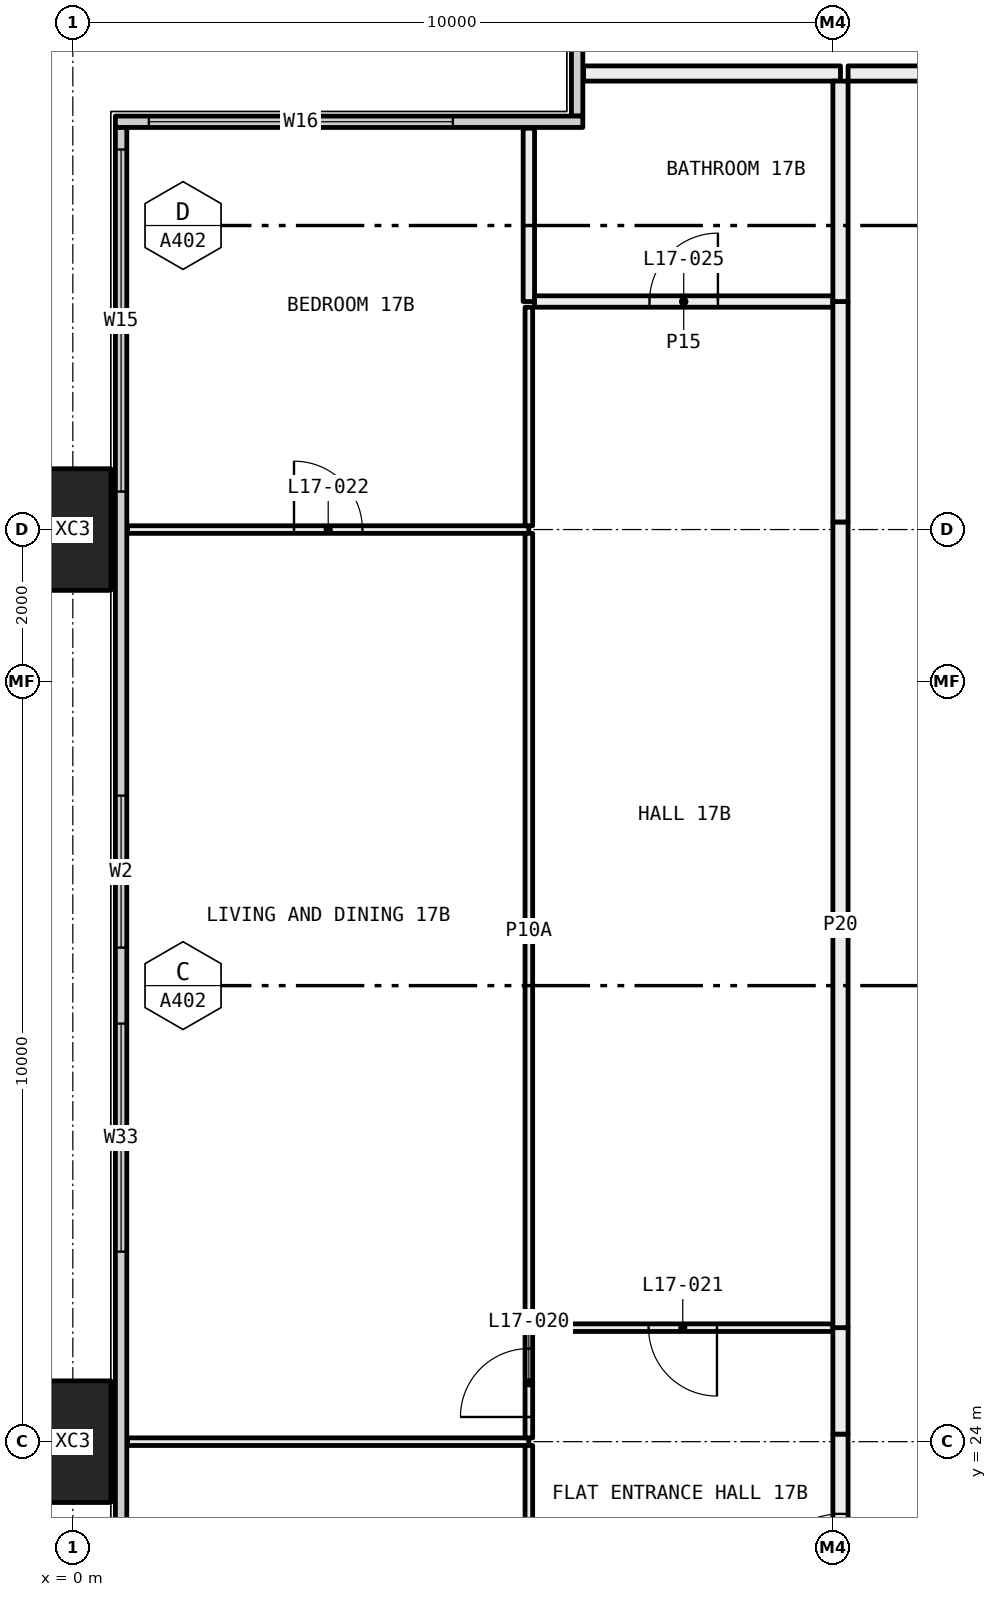
"""IFC4 building model, lengths in metres.
Left out: names, types, materials, properties, quantities, classifications, styles, units other than length and angle.
Written with IfcOpenShell. Run it as: python <this file> out.ifc"""

import sys

from ifc_helpers import new_model, si_unit, direction, frame, frame_2d, origin, origin_2d, place, context, subcontext, project, spatial, rectangle, hollow_rectangle, extrude, element, fill, save


model = new_model("IFC4")
c1 = context("Model", 3, precision=1e-05, world=origin(), true_north=direction((0.0, 1.0)))
c2 = subcontext(c1, "Body", "Model", "MODEL_VIEW")
j1 = project(units=[si_unit("LENGTHUNIT", "METRE"), si_unit("PLANEANGLEUNIT", "RADIAN")], contexts=[c1])
p1 = place(None, origin())
s1 = spatial("IfcSite", under=j1, at=p1, CompositionType="ELEMENT")
p2 = place(p1, origin())
s2 = spatial("IfcBuilding", under=s1, at=p2, CompositionType="ELEMENT")
p3 = place(p2, frame((0.0, 0.0, 71.4)))
s3 = spatial("IfcBuildingStorey", under=s2, at=p3, CompositionType="ELEMENT", Elevation=71.4)
for number, where, z_axis, x_axis in (
    (1, (0.0, 24.0, -0.4), (0.0, 0.0, 1.0), (0.0, 1.0, 0.0)),
    (2, (0.0, 36.0, -0.4), (0.0, 0.0, 1.0), (0.0, 1.0, 0.0)),
):
    element("IfcColumn", number, at=place(p3, frame(where, z_axis=z_axis, x_axis=x_axis)), inside=s3, PredefinedType="COLUMN", context=c2, shape_type="SweptSolid", body=[
        extrude(hollow_rectangle(XDim=1.6, YDim=1.0, WallThickness=0.065, at=origin_2d()), origin(), (0.0, 0.0, 1.0), 3.45),
    ])
p4 = place(p3, frame((6.635, 41.44, 0.0), z_axis=(0.0, 0.0, 1.0), x_axis=(0.0, 1.0, 0.0)))
e3 = element("IfcWall", 3, at=p4, inside=s3, PredefinedType="ELEMENTEDWALL", context=c2, shape_type="SweptSolid", body=[
    extrude(rectangle(XDim=5.85, YDim=0.15, at=frame_2d((2.925, 0.0))), origin(), (0.0, 0.0, 1.0), 3.05),
])
p5 = place(p4, frame((1.56, 0.0, 0.45)))
e4 = element("IfcOpeningElement", 4, at=p5, cuts=e3, PredefinedType="OPENING", context=c2, shape_type="SweptSolid", body=[
    extrude(rectangle(XDim=4.0, YDim=2.55, at=frame_2d((2.0, 1.275))), frame((0.0, 0.085, 0.0), z_axis=(0.0, -1.0, 0.0), x_axis=(1.0, 0.0, 0.0)), (0.0, 0.0, 1.0), 0.17),
])
p6 = place(p3, frame((0.56, 41.365, 0.0), z_axis=(0.0, 0.0, 1.0), x_axis=(1.0, 0.0, 0.0)))
e5 = element("IfcWall", 5, at=p6, inside=s3, PredefinedType="ELEMENTEDWALL", context=c2, shape_type="SweptSolid", body=[
    extrude(rectangle(XDim=6.15, YDim=0.15, at=frame_2d((3.075, 0.0))), origin(), (0.0, 0.0, 1.0), 3.05),
])
p7 = place(p6, frame((0.44, 0.0, 0.45)))
e6 = element("IfcOpeningElement", 6, at=p7, cuts=e5, PredefinedType="OPENING", context=c2, shape_type="SweptSolid", body=[
    extrude(rectangle(XDim=4.0, YDim=2.55, at=frame_2d((2.0, 1.275))), frame((0.0, 0.085, 0.0), z_axis=(0.0, -1.0, 0.0), x_axis=(1.0, 0.0, 0.0)), (0.0, 0.0, 1.0), 0.17),
])
p8 = place(p3, frame((0.635, 6.71, 0.0), z_axis=(0.0, 0.0, 1.0), x_axis=(0.0, 1.0, 0.0)))
e7 = element("IfcWall", 7, at=p8, inside=s3, PredefinedType="ELEMENTEDWALL", context=c2, shape_type="SweptSolid", body=[
    extrude(rectangle(XDim=34.58, YDim=0.15, at=frame_2d((17.29, 0.0))), origin(), (0.0, 0.0, 1.0), 3.05),
])
p9 = place(p8, frame((0.29, 0.0, 0.45)))
e8 = element("IfcOpeningElement", 8, at=p9, cuts=e7, PredefinedType="OPENING", context=c2, shape_type="SweptSolid", body=[
    extrude(rectangle(XDim=4.5, YDim=2.55, at=frame_2d((2.25, 1.275))), frame((0.0, 0.085, 0.0), z_axis=(0.0, -1.0, 0.0), x_axis=(1.0, 0.0, 0.0)), (0.0, 0.0, 1.0), 0.17),
])
p10 = place(p8, frame((7.79, 0.0, 0.45)))
e9 = element("IfcOpeningElement", 9, at=p10, cuts=e7, PredefinedType="OPENING", context=c2, shape_type="SweptSolid", body=[
    extrude(rectangle(XDim=3.0, YDim=2.55, at=frame_2d((1.5, 1.275))), frame((0.0, 0.085, 0.0), z_axis=(0.0, -1.0, 0.0), x_axis=(1.0, 0.0, 0.0)), (0.0, 0.0, 1.0), 0.17),
])
p11 = place(p8, frame((11.79, 0.0, 0.45)))
e10 = element("IfcOpeningElement", 10, at=p11, cuts=e7, PredefinedType="OPENING", context=c2, shape_type="SweptSolid", body=[
    extrude(rectangle(XDim=3.0, YDim=2.55, at=frame_2d((1.5, 1.275))), frame((0.0, 0.085, 0.0), z_axis=(0.0, -1.0, 0.0), x_axis=(1.0, 0.0, 0.0)), (0.0, 0.0, 1.0), 0.17),
])
p12 = place(p8, frame((19.79, 0.0, 0.45)))
e11 = element("IfcOpeningElement", 11, at=p12, cuts=e7, PredefinedType="OPENING", context=c2, shape_type="SweptSolid", body=[
    extrude(rectangle(XDim=3.0, YDim=2.55, at=frame_2d((1.5, 1.275))), frame((0.0, 0.085, 0.0), z_axis=(0.0, -1.0, 0.0), x_axis=(1.0, 0.0, 0.0)), (0.0, 0.0, 1.0), 0.17),
])
p13 = place(p8, frame((23.79, 0.0, 0.45)))
e12 = element("IfcOpeningElement", 12, at=p13, cuts=e7, PredefinedType="OPENING", context=c2, shape_type="SweptSolid", body=[
    extrude(rectangle(XDim=2.0, YDim=2.55, at=frame_2d((1.0, 1.275))), frame((0.0, 0.085, 0.0), z_axis=(0.0, -1.0, 0.0), x_axis=(1.0, 0.0, 0.0)), (0.0, 0.0, 1.0), 0.17),
])
p14 = place(p8, frame((29.79, 0.0, 0.45)))
e13 = element("IfcOpeningElement", 13, at=p14, cuts=e7, PredefinedType="OPENING", context=c2, shape_type="SweptSolid", body=[
    extrude(rectangle(XDim=4.5, YDim=2.55, at=frame_2d((2.25, 1.275))), frame((0.0, 0.085, 0.0), z_axis=(0.0, -1.0, 0.0), x_axis=(1.0, 0.0, 0.0)), (0.0, 0.0, 1.0), 0.17),
])
p15 = place(p3, frame((6.0, 24.0, 0.0), z_axis=(0.0, 0.0, 1.0), x_axis=(-1.0, 0.0, 0.0)))
e14 = element("IfcWall", 14, at=p15, inside=s3, PredefinedType="PARTITIONING", context=c2, shape_type="SweptSolid", body=[
    extrude(rectangle(XDim=5.28, YDim=0.1, at=frame_2d((2.64, 0.0))), origin(), (0.0, 0.0, 1.0), 2.45),
])
p16 = place(p3, frame((6.0, 21.075, 0.0), z_axis=(0.0, 0.0, 1.0), x_axis=(0.0, 1.0, 0.0)))
e15 = element("IfcWall", 15, at=p16, inside=s3, PredefinedType="PARTITIONING", context=c2, shape_type="SweptSolid", body=[
    extrude(rectangle(XDim=2.875, YDim=0.1, at=frame_2d((1.438, 0.0))), origin(), (0.0, 0.0, 1.0), 2.45),
])
p17 = place(p16, frame((0.988, 0.0, 0.0)))
e16 = element("IfcOpeningElement", 16, at=p17, cuts=e15, PredefinedType="OPENING", context=c2, shape_type="SweptSolid", body=[
    extrude(rectangle(XDim=0.9, YDim=2.1, at=frame_2d((0.45, 1.05))), frame((0.0, 0.06, 0.0), z_axis=(0.0, -1.0, 0.0), x_axis=(1.0, 0.0, 0.0)), (0.0, 0.0, 1.0), 0.12),
])
p18 = place(p3, frame((6.0, 36.0, 0.0), z_axis=(0.0, 0.0, 1.0), x_axis=(-1.0, 0.0, 0.0)))
e17 = element("IfcWall", 17, at=p18, inside=s3, PredefinedType="PARTITIONING", context=c2, shape_type="SweptSolid", body=[
    extrude(rectangle(XDim=5.28, YDim=0.1, at=frame_2d((2.64, 0.0))), origin(), (0.0, 0.0, 1.0), 2.45),
])
p19 = place(p18, frame((2.19, 0.0, 0.0)))
e18 = element("IfcOpeningElement", 18, at=p19, cuts=e17, PredefinedType="OPENING", context=c2, shape_type="SweptSolid", body=[
    extrude(rectangle(XDim=0.9, YDim=2.1, at=frame_2d((0.45, 1.05))), frame((0.0, 0.06, 0.0), z_axis=(0.0, -1.0, 0.0), x_axis=(1.0, 0.0, 0.0)), (0.0, 0.0, 1.0), 0.12),
])
p20 = place(p3, frame((6.0, 24.05, 0.0), z_axis=(0.0, 0.0, 1.0), x_axis=(0.0, 1.0, 0.0)))
e19 = element("IfcWall", 19, at=p20, inside=s3, PredefinedType="PARTITIONING", context=c2, shape_type="SweptSolid", body=[
    extrude(rectangle(XDim=1.45, YDim=0.1, at=frame_2d((0.725, 0.0))), origin(), (0.0, 0.0, 1.0), 2.45),
])
p21 = place(p20, frame((0.275, 0.0, 0.0)))
e20 = element("IfcOpeningElement", 20, at=p21, cuts=e19, PredefinedType="OPENING", context=c2, shape_type="SweptSolid", body=[
    extrude(rectangle(XDim=0.9, YDim=2.1, at=frame_2d((0.45, 1.05))), frame((0.0, 0.06, 0.0), z_axis=(0.0, -1.0, 0.0), x_axis=(1.0, 0.0, 0.0)), (0.0, 0.0, 1.0), 0.12),
])
p22 = place(p3, frame((6.0, 25.5, 0.0), z_axis=(0.0, 0.0, 1.0), x_axis=(0.0, 1.0, 0.0)))
e21 = element("IfcWall", 21, at=p22, inside=s3, PredefinedType="PARTITIONING", context=c2, shape_type="SweptSolid", body=[
    extrude(rectangle(XDim=10.45, YDim=0.1, at=frame_2d((5.225, 0.0))), origin(), (0.0, 0.0, 1.0), 2.45),
])
p23 = place(p3, frame((6.0, 36.05, 0.0), z_axis=(0.0, 0.0, 1.0), x_axis=(0.0, 1.0, 0.0)))
e22 = element("IfcWall", 22, at=p23, inside=s3, PredefinedType="PARTITIONING", context=c2, shape_type="SweptSolid", body=[
    extrude(rectangle(XDim=2.875, YDim=0.1, at=frame_2d((1.438, 0.0))), origin(), (0.0, 0.0, 1.0), 2.45),
])
p24 = place(p3, frame((6.0, 39.0, 0.0), z_axis=(0.0, 0.0, 1.0), x_axis=(0.0, 1.0, 0.0)))
e23 = element("IfcWall", 23, at=p24, inside=s3, PredefinedType="PARTITIONING", context=c2, shape_type="SweptSolid", body=[
    extrude(rectangle(XDim=2.28, YDim=0.15, at=frame_2d((1.14, 0.0))), origin(), (0.0, 0.0, 1.0), 3.05),
])
p25 = place(p3, frame((10.0, 25.5, 0.0), z_axis=(0.0, 0.0, 1.0), x_axis=(-1.0, 0.0, 0.0)))
e24 = element("IfcWall", 24, at=p25, inside=s3, PredefinedType="PARTITIONING", context=c2, shape_type="SweptSolid", body=[
    extrude(rectangle(XDim=3.95, YDim=0.1, at=frame_2d((1.975, 0.0))), origin(), (0.0, 0.0, 1.0), 3.05),
])
p26 = place(p25, frame((1.525, 0.0, 0.0)))
e25 = element("IfcOpeningElement", 25, at=p26, cuts=e24, PredefinedType="OPENING", context=c2, shape_type="SweptSolid", body=[
    extrude(rectangle(XDim=0.9, YDim=2.1, at=frame_2d((0.45, 1.05))), frame((0.0, 0.06, 0.0), z_axis=(0.0, -1.0, 0.0), x_axis=(1.0, 0.0, 0.0)), (0.0, 0.0, 1.0), 0.12),
])
p27 = place(p3, frame((10.1, 21.0, 0.0), z_axis=(0.0, 0.0, 1.0), x_axis=(0.0, 1.0, 0.0)))
e26 = element("IfcWall", 26, at=p27, inside=s3, PredefinedType="PARTITIONING", context=c2, shape_type="SweptSolid", body=[
    extrude(rectangle(XDim=3.1, YDim=0.2, at=frame_2d((1.55, 0.0))), origin(), (0.0, 0.0, 1.0), 2.45),
])
p28 = place(p27, frame((1.05, 0.0, 0.0)))
e27 = element("IfcOpeningElement", 27, at=p28, cuts=e26, PredefinedType="OPENING", context=c2, shape_type="SweptSolid", body=[
    extrude(rectangle(XDim=1.0, YDim=2.1, at=frame_2d((0.5, 1.05))), frame((0.0, 0.11, 0.0), z_axis=(0.0, -1.0, 0.0), x_axis=(1.0, 0.0, 0.0)), (0.0, 0.0, 1.0), 0.22),
])
p29 = place(p3, frame((10.1, 24.1, 0.0), z_axis=(0.0, 0.0, 1.0), x_axis=(0.0, 1.0, 0.0)))
e28 = element("IfcWall", 28, at=p29, inside=s3, PredefinedType="PARTITIONING", context=c2, shape_type="SweptSolid", body=[
    extrude(rectangle(XDim=1.4, YDim=0.2, at=frame_2d((0.7, 0.0))), origin(), (0.0, 0.0, 1.0), 3.05),
])
p30 = place(p3, frame((10.0, 39.0, 0.0), z_axis=(0.0, 0.0, 1.0), x_axis=(-1.0, 0.0, 0.0)))
e29 = element("IfcWall", 29, at=p30, inside=s3, PredefinedType="PARTITIONING", context=c2, shape_type="SweptSolid", body=[
    extrude(rectangle(XDim=3.925, YDim=0.15, at=frame_2d((1.962, 0.0))), origin(), (0.0, 0.0, 1.0), 3.05),
])
p31 = place(p30, frame((1.512, 0.0, 0.0)))
e30 = element("IfcOpeningElement", 30, at=p31, cuts=e29, PredefinedType="OPENING", context=c2, shape_type="SweptSolid", body=[
    extrude(rectangle(XDim=0.9, YDim=2.1, at=frame_2d((0.45, 1.05))), frame((0.0, 0.085, 0.0), z_axis=(0.0, -1.0, 0.0), x_axis=(1.0, 0.0, 0.0)), (0.0, 0.0, 1.0), 0.17),
])
p32 = place(p3, frame((10.1, 25.5, 0.0), z_axis=(0.0, 0.0, 1.0), x_axis=(0.0, 1.0, 0.0)))
e31 = element("IfcWall", 31, at=p32, inside=s3, PredefinedType="PARTITIONING", context=c2, shape_type="SweptSolid", body=[
    extrude(rectangle(XDim=10.6, YDim=0.2, at=frame_2d((5.3, 0.0))), origin(), (0.0, 0.0, 1.0), 2.45),
])
p33 = place(p3, frame((10.1, 36.1, 0.0), z_axis=(0.0, 0.0, 1.0), x_axis=(0.0, 1.0, 0.0)))
e32 = element("IfcWall", 32, at=p33, inside=s3, PredefinedType="PARTITIONING", context=c2, shape_type="SweptSolid", body=[
    extrude(rectangle(XDim=2.9, YDim=0.2, at=frame_2d((1.45, 0.0))), origin(), (0.0, 0.0, 1.0), 3.05),
])
p34 = place(p3, frame((10.1, 42.0, 0.0), z_axis=(0.0, 0.0, 1.0), x_axis=(-1.0, 0.0, 0.0)))
e33 = element("IfcWall", 33, at=p34, inside=s3, PredefinedType="PARTITIONING", context=c2, shape_type="SweptSolid", body=[
    extrude(rectangle(XDim=3.38, YDim=0.2, at=frame_2d((1.69, 0.0))), origin(), (0.0, 0.0, 1.0), 3.05),
])
p35 = place(p3, frame((10.1, 39.0, 0.0), z_axis=(0.0, 0.0, 1.0), x_axis=(0.0, 1.0, 0.0)))
e34 = element("IfcWall", 34, at=p35, inside=s3, PredefinedType="PARTITIONING", context=c2, shape_type="SweptSolid", body=[
    extrude(rectangle(XDim=2.9, YDim=0.2, at=frame_2d((1.45, 0.0))), origin(), (0.0, 0.0, 1.0), 3.05),
])
p36 = place(p3, frame((10.2, 42.0, 0.0), z_axis=(0.0, 0.0, 1.0), x_axis=(1.0, 0.0, 0.0)))
e35 = element("IfcWall", 35, at=p36, inside=s3, PredefinedType="PARTITIONING", context=c2, shape_type="SweptSolid", body=[
    extrude(rectangle(XDim=1.8, YDim=0.2, at=frame_2d((0.9, 0.0))), origin(), (0.0, 0.0, 1.0), 3.05),
])
p37 = place(p7, origin())
e36 = element("IfcWindow", 36, at=p37, inside=s3, PartitioningType="SINGLE_PANEL", PredefinedType="WINDOW", context=c2, shape_type="SweptSolid", body=[
    extrude(rectangle(XDim=4.0, YDim=2.55, at=frame_2d((2.0, 1.275))), frame((0.0, 0.03, 0.0), z_axis=(0.0, -1.0, 0.0), x_axis=(1.0, 0.0, 0.0)), (0.0, 0.0, 1.0), 0.06),
])
fill(e6, e36)
p38 = place(p12, origin())
e37 = element("IfcWindow", 37, at=p38, inside=s3, PartitioningType="SINGLE_PANEL", PredefinedType="WINDOW", context=c2, shape_type="SweptSolid", body=[
    extrude(rectangle(XDim=3.0, YDim=2.55, at=frame_2d((1.5, 1.275))), frame((0.0, 0.03, 0.0), z_axis=(0.0, -1.0, 0.0), x_axis=(1.0, 0.0, 0.0)), (0.0, 0.0, 1.0), 0.06),
])
fill(e11, e37)
p39 = place(p13, origin())
e38 = element("IfcWindow", 38, at=p39, inside=s3, PartitioningType="SINGLE_PANEL", PredefinedType="WINDOW", context=c2, shape_type="SweptSolid", body=[
    extrude(rectangle(XDim=2.0, YDim=2.55, at=frame_2d((1.0, 1.275))), frame((0.0, 0.03, 0.0), z_axis=(0.0, -1.0, 0.0), x_axis=(1.0, 0.0, 0.0)), (0.0, 0.0, 1.0), 0.06),
])
fill(e12, e38)
p40 = place(p14, origin())
e39 = element("IfcWindow", 39, at=p40, inside=s3, PartitioningType="SINGLE_PANEL", PredefinedType="WINDOW", context=c2, shape_type="SweptSolid", body=[
    extrude(rectangle(XDim=4.5, YDim=2.55, at=frame_2d((2.25, 1.275))), frame((0.0, 0.03, 0.0), z_axis=(0.0, -1.0, 0.0), x_axis=(1.0, 0.0, 0.0)), (0.0, 0.0, 1.0), 0.06),
])
fill(e13, e39)
p41 = place(p28, origin())
e40 = element("IfcDoor", 40, at=p41, inside=s3, OperationType="SINGLE_SWING_RIGHT", PredefinedType="DOOR", context=c2, shape_type="SweptSolid", body=[
    extrude(rectangle(XDim=1.0, YDim=2.1, at=frame_2d((0.5, 1.05))), frame((0.0, 0.025, 0.0), z_axis=(0.0, -1.0, 0.0), x_axis=(1.0, 0.0, 0.0)), (0.0, 0.0, 1.0), 0.05),
])
fill(e27, e40)
p42 = place(p21, origin())
e41 = element("IfcDoor", 41, at=p42, inside=s3, OperationType="SINGLE_SWING_RIGHT", PredefinedType="DOOR", context=c2, shape_type="SweptSolid", body=[
    extrude(rectangle(XDim=0.9, YDim=2.1, at=frame_2d((0.45, 1.05))), frame((0.0, 0.025, 0.0), z_axis=(0.0, -1.0, 0.0), x_axis=(1.0, 0.0, 0.0)), (0.0, 0.0, 1.0), 0.05),
])
fill(e20, e41)
p43 = place(p26, origin())
e42 = element("IfcDoor", 42, at=p43, inside=s3, OperationType="SINGLE_SWING_RIGHT", PredefinedType="DOOR", context=c2, shape_type="SweptSolid", body=[
    extrude(rectangle(XDim=0.9, YDim=2.1, at=frame_2d((0.45, 1.05))), frame((0.0, 0.025, 0.0), z_axis=(0.0, -1.0, 0.0), x_axis=(1.0, 0.0, 0.0)), (0.0, 0.0, 1.0), 0.05),
])
fill(e25, e42)
p44 = place(p19, frame((0.9, 0.0, 0.0), x_axis=(-1.0, 0.0, 0.0)))
e43 = element("IfcDoor", 43, at=p44, inside=s3, OperationType="SINGLE_SWING_RIGHT", PredefinedType="DOOR", context=c2, shape_type="SweptSolid", body=[
    extrude(rectangle(XDim=0.9, YDim=2.1, at=frame_2d((0.45, 1.05))), frame((0.0, 0.025, 0.0), z_axis=(0.0, -1.0, 0.0), x_axis=(1.0, 0.0, 0.0)), (0.0, 0.0, 1.0), 0.05),
])
fill(e18, e43)
p45 = place(p31, frame((0.9, 0.0, 0.0), x_axis=(-1.0, 0.0, 0.0)))
e44 = element("IfcDoor", 44, at=p45, inside=s3, OperationType="SINGLE_SWING_LEFT", PredefinedType="DOOR", context=c2, shape_type="SweptSolid", body=[
    extrude(rectangle(XDim=0.9, YDim=2.1, at=frame_2d((0.45, 1.05))), frame((0.0, 0.025, 0.0), z_axis=(0.0, -1.0, 0.0), x_axis=(1.0, 0.0, 0.0)), (0.0, 0.0, 1.0), 0.05),
])
fill(e30, e44)
save(model, sys.argv[1])
